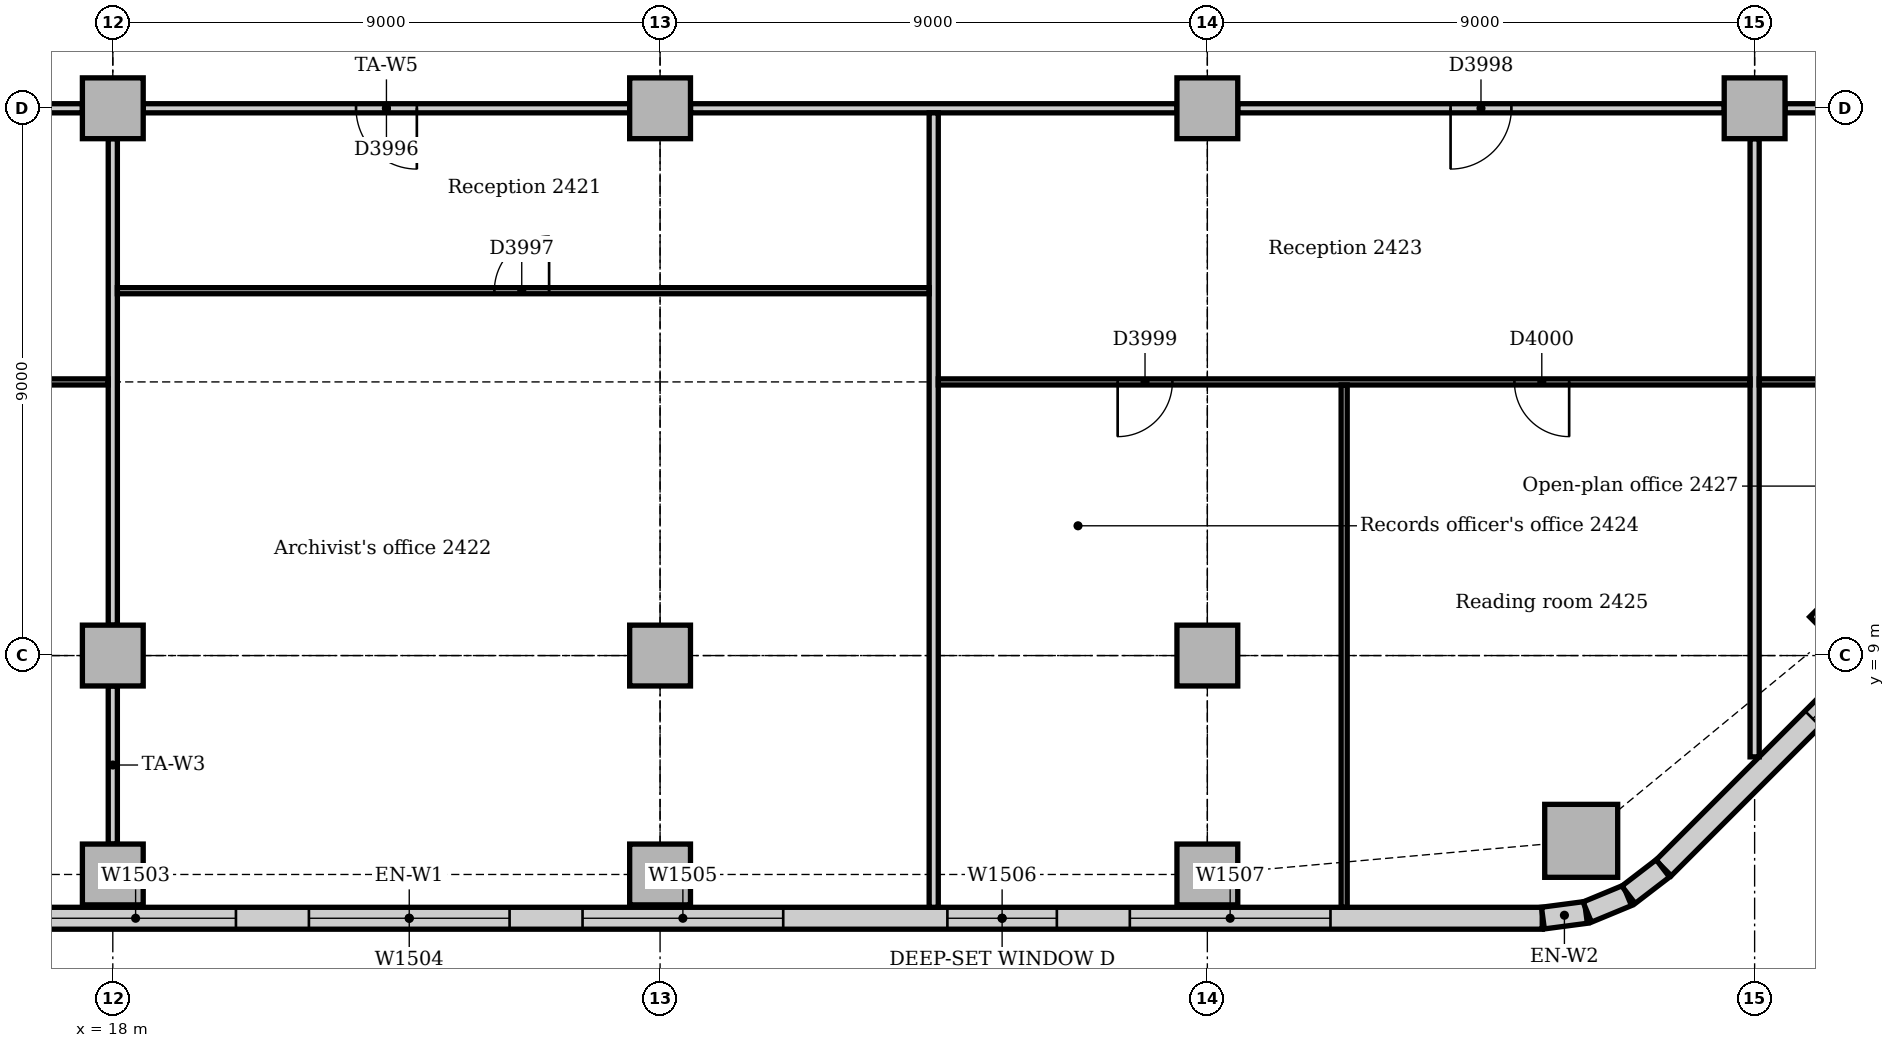
"""IFC4 building model, lengths in metres.
Left out: names, types, materials, properties, quantities, classifications, styles, units other than length and angle.
Written with IfcOpenShell. Run it as: python <this file> out.ifc"""

import sys

from ifc_helpers import new_model, si_unit, direction, frame, frame_2d, origin, origin_2d, place, context, subcontext, project, spatial, rectangle, extrude, element, fill, save


model = new_model("IFC4")
c1 = context("Model", 3, precision=1e-05, world=origin(), true_north=direction((0.0, 1.0)))
c2 = subcontext(c1, "Body", "Model", "MODEL_VIEW")
j1 = project(units=[si_unit("LENGTHUNIT", "METRE"), si_unit("PLANEANGLEUNIT", "RADIAN")], contexts=[c1])
p1 = place(None, origin())
s1 = spatial("IfcSite", under=j1, at=p1, CompositionType="ELEMENT")
p2 = place(p1, origin())
s2 = spatial("IfcBuilding", under=s1, at=p2, CompositionType="ELEMENT")
p3 = place(p2, frame((0.0, 0.0, 104.0)))
s3 = spatial("IfcBuildingStorey", under=s2, at=p3, CompositionType="ELEMENT", Elevation=104.0)
p4 = place(p3, frame((42.148, 5.953, 0.0), z_axis=(0.0, 0.0, 1.0), x_axis=(1.0, 0.0, 0.0)))
e1 = element("IfcColumn", 1, at=p4, inside=s3, PredefinedType="COLUMN", context=c2, shape_type="SweptSolid", body=[
    extrude(rectangle(XDim=1.2, YDim=1.2, at=origin_2d()), origin(), (0.0, 0.0, 1.0), 3.85),
])
for number, where, z_axis, x_axis in (
    (2, (18.0, 5.4, 0.0), (0.0, 0.0, 1.0), (1.0, 0.0, 0.0)),
    (3, (27.0, 5.4, 0.0), (0.0, 0.0, 1.0), (1.0, 0.0, 0.0)),
    (4, (36.0, 5.4, 0.0), (0.0, 0.0, 1.0), (1.0, 0.0, 0.0)),
    (5, (46.614, 9.636, 0.0), (0.0, 0.0, 1.0), (0.707, 0.707, 0.0)),
    (6, (18.0, 9.0, 0.0), (0.0, 0.0, 1.0), (1.0, 0.0, 0.0)),
    (7, (18.0, 18.0, 0.0), (0.0, 0.0, 1.0), (1.0, 0.0, 0.0)),
    (8, (27.0, 9.0, 0.0), (0.0, 0.0, 1.0), (1.0, 0.0, 0.0)),
    (9, (27.0, 18.0, 0.0), (0.0, 0.0, 1.0), (1.0, 0.0, 0.0)),
    (10, (36.0, 9.0, 0.0), (0.0, 0.0, 1.0), (1.0, 0.0, 0.0)),
    (11, (36.0, 18.0, 0.0), (0.0, 0.0, 1.0), (1.0, 0.0, 0.0)),
    (12, (45.0, 18.0, 0.0), (0.0, 0.0, 1.0), (1.0, 0.0, 0.0)),
):
    element("IfcColumn", number, at=place(p3, frame(where, z_axis=z_axis, x_axis=x_axis)), inside=s3, PredefinedType="COLUMN", context=c2, shape_type="SweptSolid", body=[
        extrude(rectangle(XDim=1.0, YDim=1.0, at=origin_2d()), origin(), (0.0, 0.0, 1.0), 3.85),
    ])
p5 = place(p3, frame((4.243, 4.68, 0.0), z_axis=(0.0, 0.0, 1.0), x_axis=(1.0, 0.0, 0.0)))
e13 = element("IfcWall", 13, at=p5, inside=s3, PredefinedType="STANDARD", context=c2, shape_type="SweptSolid", body=[
    extrude(rectangle(XDim=37.265, YDim=0.36, at=frame_2d((18.632, 0.0))), origin(), (0.0, 0.0, 1.0), 3.85),
])
p6 = place(p5, frame((3.482, 0.0, 0.9)))
e14 = element("IfcOpeningElement", 14, at=p6, cuts=e13, PredefinedType="OPENING", context=c2, shape_type="SweptSolid", body=[
    extrude(rectangle(XDim=3.3, YDim=1.6, at=frame_2d((1.65, 0.8))), frame((0.0, 0.19, 0.0), z_axis=(0.0, -1.0, 0.0), x_axis=(1.0, 0.0, 0.0)), (0.0, 0.0, 1.0), 0.38),
])
p7 = place(p5, frame((7.982, 0.0, 0.9)))
e15 = element("IfcOpeningElement", 15, at=p7, cuts=e13, PredefinedType="OPENING", context=c2, shape_type="SweptSolid", body=[
    extrude(rectangle(XDim=3.3, YDim=1.6, at=frame_2d((1.65, 0.8))), frame((0.0, 0.19, 0.0), z_axis=(0.0, -1.0, 0.0), x_axis=(1.0, 0.0, 0.0)), (0.0, 0.0, 1.0), 0.38),
])
p8 = place(p5, frame((12.482, 0.0, 0.9)))
e16 = element("IfcOpeningElement", 16, at=p8, cuts=e13, PredefinedType="OPENING", context=c2, shape_type="SweptSolid", body=[
    extrude(rectangle(XDim=3.3, YDim=1.6, at=frame_2d((1.65, 0.8))), frame((0.0, 0.19, 0.0), z_axis=(0.0, -1.0, 0.0), x_axis=(1.0, 0.0, 0.0)), (0.0, 0.0, 1.0), 0.38),
])
p9 = place(p5, frame((16.982, 0.0, 0.9)))
e17 = element("IfcOpeningElement", 17, at=p9, cuts=e13, PredefinedType="OPENING", context=c2, shape_type="SweptSolid", body=[
    extrude(rectangle(XDim=3.3, YDim=1.6, at=frame_2d((1.65, 0.8))), frame((0.0, 0.19, 0.0), z_axis=(0.0, -1.0, 0.0), x_axis=(1.0, 0.0, 0.0)), (0.0, 0.0, 1.0), 0.38),
])
p10 = place(p5, frame((21.482, 0.0, 0.9)))
e18 = element("IfcOpeningElement", 18, at=p10, cuts=e13, PredefinedType="OPENING", context=c2, shape_type="SweptSolid", body=[
    extrude(rectangle(XDim=3.3, YDim=1.6, at=frame_2d((1.65, 0.8))), frame((0.0, 0.19, 0.0), z_axis=(0.0, -1.0, 0.0), x_axis=(1.0, 0.0, 0.0)), (0.0, 0.0, 1.0), 0.38),
])
p11 = place(p5, frame((27.482, 0.0, 0.9)))
e19 = element("IfcOpeningElement", 19, at=p11, cuts=e13, PredefinedType="OPENING", context=c2, shape_type="SweptSolid", body=[
    extrude(rectangle(XDim=1.8, YDim=1.6, at=frame_2d((0.9, 0.8))), frame((0.0, 0.19, 0.0), z_axis=(0.0, -1.0, 0.0), x_axis=(1.0, 0.0, 0.0)), (0.0, 0.0, 1.0), 0.38),
])
p12 = place(p5, frame((30.482, 0.0, 0.9)))
e20 = element("IfcOpeningElement", 20, at=p12, cuts=e13, PredefinedType="OPENING", context=c2, shape_type="SweptSolid", body=[
    extrude(rectangle(XDim=3.3, YDim=1.6, at=frame_2d((1.65, 0.8))), frame((0.0, 0.19, 0.0), z_axis=(0.0, -1.0, 0.0), x_axis=(1.0, 0.0, 0.0)), (0.0, 0.0, 1.0), 0.38),
])
p13 = place(p3, frame((43.501, 5.506, 0.0), z_axis=(0.0, 0.0, 1.0), x_axis=(0.707106781187, 0.707106781187, 0.0)))
e21 = element("IfcWall", 21, at=p13, inside=s3, PredefinedType="STANDARD", context=c2, shape_type="SweptSolid", body=[
    extrude(rectangle(XDim=10.243, YDim=0.36, at=frame_2d((5.121, 0.0))), origin(), (0.0, 0.0, 1.0), 3.85),
])
p14 = place(p13, frame((3.471, 0.0, 0.9)))
e22 = element("IfcOpeningElement", 22, at=p14, cuts=e21, PredefinedType="OPENING", context=c2, shape_type="SweptSolid", body=[
    extrude(rectangle(XDim=3.3, YDim=1.6, at=frame_2d((1.65, 0.8))), frame((0.0, 0.19, 0.0), z_axis=(0.0, -1.0, 0.0), x_axis=(1.0, 0.0, 0.0)), (0.0, 0.0, 1.0), 0.38),
])
for number, where, z_axis, x_axis in (
    (23, (41.519, 4.683, 0.0), (0.0, 0.0, 1.0), (0.991, 0.131, 0.0)),
    (24, (42.247, 4.782, 0.0), (0.0, 0.0, 1.0), (0.924, 0.383, 0.0)),
):
    element("IfcWall", number, at=place(p3, frame(where, z_axis=z_axis, x_axis=x_axis)), inside=s3, PredefinedType="STANDARD", context=c2, shape_type="SweptSolid", body=[
        extrude(rectangle(XDim=0.713, YDim=0.36, at=frame_2d((0.356, 0.0))), origin(), (0.0, 0.0, 1.0), 3.85),
    ])
p15 = place(p3, frame((42.925, 5.066, 0.0), z_axis=(0.0, 0.0, 1.0), x_axis=(0.793321924995, 0.608802368033, 0.0)))
e25 = element("IfcWall", 25, at=p15, inside=s3, PredefinedType="STANDARD", context=c2, shape_type="SweptSolid", body=[
    extrude(rectangle(XDim=0.713, YDim=0.36, at=frame_2d((0.357, 0.0))), origin(), (0.0, 0.0, 1.0), 3.85),
])
p16 = place(p3, frame((45.5, 18.0, 0.0), z_axis=(0.0, 0.0, 1.0), x_axis=(1.0, 0.0, 0.0)))
e26 = element("IfcWall", 26, at=p16, inside=s3, PredefinedType="PARTITIONING", context=c2, shape_type="SweptSolid", body=[
    extrude(rectangle(XDim=4.85, YDim=0.15, at=frame_2d((2.425, 0.0))), origin(), (0.0, 0.0, 1.0), 3.254),
])
p17 = place(p16, frame((1.9, 0.0, 0.0)))
e27 = element("IfcOpeningElement", 27, at=p17, cuts=e26, PredefinedType="OPENING", context=c2, shape_type="SweptSolid", body=[
    extrude(rectangle(XDim=1.0, YDim=2.1, at=frame_2d((0.5, 1.05))), frame((0.0, 0.085, 0.0), z_axis=(0.0, -1.0, 0.0), x_axis=(1.0, 0.0, 0.0)), (0.0, 0.0, 1.0), 0.17),
])
p18 = place(p3, frame((36.5, 18.0, 0.0), z_axis=(0.0, 0.0, 1.0), x_axis=(1.0, 0.0, 0.0)))
e28 = element("IfcWall", 28, at=p18, inside=s3, PredefinedType="PARTITIONING", context=c2, shape_type="SweptSolid", body=[
    extrude(rectangle(XDim=8.0, YDim=0.15, at=frame_2d((4.0, 0.0))), origin(), (0.0, 0.0, 1.0), 3.158),
])
p19 = place(p18, frame((3.5, 0.0, 0.0)))
e29 = element("IfcOpeningElement", 29, at=p19, cuts=e28, PredefinedType="OPENING", context=c2, shape_type="SweptSolid", body=[
    extrude(rectangle(XDim=1.0, YDim=2.1, at=frame_2d((0.5, 1.05))), frame((0.0, 0.085, 0.0), z_axis=(0.0, -1.0, 0.0), x_axis=(1.0, 0.0, 0.0)), (0.0, 0.0, 1.0), 0.17),
])
p20 = place(p3, frame((27.5, 18.0, 0.0), z_axis=(0.0, 0.0, 1.0), x_axis=(1.0, 0.0, 0.0)))
e30 = element("IfcWall", 30, at=p20, inside=s3, PredefinedType="PARTITIONING", context=c2, shape_type="SweptSolid", body=[
    extrude(rectangle(XDim=8.0, YDim=0.15, at=frame_2d((4.0, 0.0))), origin(), (0.0, 0.0, 1.0), 3.158),
])
p21 = place(p3, frame((18.5, 18.0, 0.0), z_axis=(0.0, 0.0, 1.0), x_axis=(1.0, 0.0, 0.0)))
e31 = element("IfcWall", 31, at=p21, inside=s3, PredefinedType="PARTITIONING", context=c2, shape_type="SweptSolid", body=[
    extrude(rectangle(XDim=8.0, YDim=0.15, at=frame_2d((4.0, 0.0))), origin(), (0.0, 0.0, 1.0), 3.158),
])
p22 = place(p21, frame((3.5, 0.0, 0.0)))
e32 = element("IfcOpeningElement", 32, at=p22, cuts=e31, PredefinedType="OPENING", context=c2, shape_type="SweptSolid", body=[
    extrude(rectangle(XDim=1.0, YDim=2.1, at=frame_2d((0.5, 1.05))), frame((0.0, 0.085, 0.0), z_axis=(0.0, -1.0, 0.0), x_axis=(1.0, 0.0, 0.0)), (0.0, 0.0, 1.0), 0.17),
])
p23 = place(p3, frame((9.5, 18.0, 0.0), z_axis=(0.0, 0.0, 1.0), x_axis=(1.0, 0.0, 0.0)))
e33 = element("IfcWall", 33, at=p23, inside=s3, PredefinedType="PARTITIONING", context=c2, shape_type="SweptSolid", body=[
    extrude(rectangle(XDim=8.0, YDim=0.15, at=frame_2d((4.0, 0.0))), origin(), (0.0, 0.0, 1.0), 3.158),
])
p24 = place(p23, frame((3.5, 0.0, 0.0)))
e34 = element("IfcOpeningElement", 34, at=p24, cuts=e33, PredefinedType="OPENING", context=c2, shape_type="SweptSolid", body=[
    extrude(rectangle(XDim=1.0, YDim=2.1, at=frame_2d((0.5, 1.05))), frame((0.0, 0.085, 0.0), z_axis=(0.0, -1.0, 0.0), x_axis=(1.0, 0.0, 0.0)), (0.0, 0.0, 1.0), 0.17),
])
p25 = place(p3, frame((18.0, 5.9, 0.0), z_axis=(0.0, 0.0, 1.0), x_axis=(0.0, 1.0, 0.0)))
e35 = element("IfcWall", 35, at=p25, inside=s3, PredefinedType="PARTITIONING", context=c2, shape_type="SweptSolid", body=[
    extrude(rectangle(XDim=2.6, YDim=0.15, at=frame_2d((1.3, 0.0))), origin(), (0.0, 0.0, 1.0), 3.652),
])
p26 = place(p3, frame((18.0, 9.5, 0.0), z_axis=(0.0, 0.0, 1.0), x_axis=(0.0, 1.0, 0.0)))
e36 = element("IfcWall", 36, at=p26, inside=s3, PredefinedType="PARTITIONING", context=c2, shape_type="SweptSolid", body=[
    extrude(rectangle(XDim=8.0, YDim=0.15, at=frame_2d((4.0, 0.0))), origin(), (0.0, 0.0, 1.0), 3.256),
])
p27 = place(p3, frame((31.5, 4.86, 0.0), z_axis=(0.0, 0.0, 1.0), x_axis=(0.0, 1.0, 0.0)))
e37 = element("IfcWall", 37, at=p27, inside=s3, PredefinedType="PARTITIONING", context=c2, shape_type="SweptSolid", body=[
    extrude(rectangle(XDim=13.065, YDim=0.15, at=frame_2d((6.532, 0.0))), origin(), (0.0, 0.0, 1.0), 3.85),
])
p28 = place(p3, frame((45.0, 7.334, 0.0), z_axis=(0.0, 0.0, 1.0), x_axis=(0.0, 1.0, 0.0)))
e38 = element("IfcWall", 38, at=p28, inside=s3, PredefinedType="PARTITIONING", context=c2, shape_type="SweptSolid", body=[
    extrude(rectangle(XDim=10.166, YDim=0.15, at=frame_2d((5.083, 0.0))), origin(), (0.0, 0.0, 1.0), 3.256),
])
p29 = place(p3, frame((31.575, 13.5, 0.0), z_axis=(0.0, 0.0, 1.0), x_axis=(1.0, 0.0, 0.0)))
e39 = element("IfcWall", 39, at=p29, inside=s3, PredefinedType="PARTITIONING", context=c2, shape_type="SweptSolid", body=[
    extrude(rectangle(XDim=13.35, YDim=0.1, at=frame_2d((6.675, 0.0))), origin(), (0.0, 0.0, 1.0), 3.354),
])
p30 = place(p29, frame((2.95, 0.0, 0.0)))
e40 = element("IfcOpeningElement", 40, at=p30, cuts=e39, PredefinedType="OPENING", context=c2, shape_type="SweptSolid", body=[
    extrude(rectangle(XDim=0.9, YDim=2.1, at=frame_2d((0.45, 1.05))), frame((0.0, 0.06, 0.0), z_axis=(0.0, -1.0, 0.0), x_axis=(1.0, 0.0, 0.0)), (0.0, 0.0, 1.0), 0.12),
])
p31 = place(p29, frame((9.475, 0.0, 0.0)))
e41 = element("IfcOpeningElement", 41, at=p31, cuts=e39, PredefinedType="OPENING", context=c2, shape_type="SweptSolid", body=[
    extrude(rectangle(XDim=0.9, YDim=2.1, at=frame_2d((0.45, 1.05))), frame((0.0, 0.06, 0.0), z_axis=(0.0, -1.0, 0.0), x_axis=(1.0, 0.0, 0.0)), (0.0, 0.0, 1.0), 0.12),
])
p32 = place(p3, frame((45.075, 13.5, 0.0), z_axis=(0.0, 0.0, 1.0), x_axis=(1.0, 0.0, 0.0)))
e42 = element("IfcWall", 42, at=p32, inside=s3, PredefinedType="PARTITIONING", context=c2, shape_type="SweptSolid", body=[
    extrude(rectangle(XDim=5.969, YDim=0.1, at=frame_2d((2.985, 0.0))), origin(), (0.0, 0.0, 1.0), 3.454),
])
p33 = place(p32, frame((2.55, 0.0, 0.0)))
e43 = element("IfcOpeningElement", 43, at=p33, cuts=e42, PredefinedType="OPENING", context=c2, shape_type="SweptSolid", body=[
    extrude(rectangle(XDim=0.9, YDim=2.1, at=frame_2d((0.45, 1.05))), frame((0.0, 0.06, 0.0), z_axis=(0.0, -1.0, 0.0), x_axis=(1.0, 0.0, 0.0)), (0.0, 0.0, 1.0), 0.12),
])
p34 = place(p3, frame((0.36, 13.5, 0.0), z_axis=(0.0, 0.0, 1.0), x_axis=(1.0, 0.0, 0.0)))
e44 = element("IfcWall", 44, at=p34, inside=s3, PredefinedType="PARTITIONING", context=c2, shape_type="SweptSolid", body=[
    extrude(rectangle(XDim=17.565, YDim=0.1, at=frame_2d((8.783, 0.0))), origin(), (0.0, 0.0, 1.0), 3.354),
])
p35 = place(p34, frame((3.95, 0.0, 0.0)))
e45 = element("IfcOpeningElement", 45, at=p35, cuts=e44, PredefinedType="OPENING", context=c2, shape_type="SweptSolid", body=[
    extrude(rectangle(XDim=0.9, YDim=2.1, at=frame_2d((0.45, 1.05))), frame((0.0, 0.06, 0.0), z_axis=(0.0, -1.0, 0.0), x_axis=(1.0, 0.0, 0.0)), (0.0, 0.0, 1.0), 0.12),
])
p36 = place(p34, frame((12.59, 0.0, 0.0)))
e46 = element("IfcOpeningElement", 46, at=p36, cuts=e44, PredefinedType="OPENING", context=c2, shape_type="SweptSolid", body=[
    extrude(rectangle(XDim=0.9, YDim=2.1, at=frame_2d((0.45, 1.05))), frame((0.0, 0.06, 0.0), z_axis=(0.0, -1.0, 0.0), x_axis=(1.0, 0.0, 0.0)), (0.0, 0.0, 1.0), 0.12),
])
p37 = place(p3, frame((18.075, 15.0, 0.0), z_axis=(0.0, 0.0, 1.0), x_axis=(1.0, 0.0, 0.0)))
e47 = element("IfcWall", 47, at=p37, inside=s3, PredefinedType="PARTITIONING", context=c2, shape_type="SweptSolid", body=[
    extrude(rectangle(XDim=13.35, YDim=0.1, at=frame_2d((6.675, 0.0))), origin(), (0.0, 0.0, 1.0), 3.85),
])
p38 = place(p37, frame((6.2, 0.0, 0.0)))
e48 = element("IfcOpeningElement", 48, at=p38, cuts=e47, PredefinedType="OPENING", context=c2, shape_type="SweptSolid", body=[
    extrude(rectangle(XDim=0.9, YDim=2.1, at=frame_2d((0.45, 1.05))), frame((0.0, 0.06, 0.0), z_axis=(0.0, -1.0, 0.0), x_axis=(1.0, 0.0, 0.0)), (0.0, 0.0, 1.0), 0.12),
])
p39 = place(p3, frame((38.25, 4.86, 0.0), z_axis=(0.0, 0.0, 1.0), x_axis=(0.0, 1.0, 0.0)))
e49 = element("IfcWall", 49, at=p39, inside=s3, PredefinedType="PARTITIONING", context=c2, shape_type="SweptSolid", body=[
    extrude(rectangle(XDim=8.59, YDim=0.1, at=frame_2d((4.295, 0.0))), origin(), (0.0, 0.0, 1.0), 3.85),
])
p40 = place(p8, origin())
e50 = element("IfcWindow", 50, at=p40, inside=s3, PartitioningType="SINGLE_PANEL", PredefinedType="WINDOW", context=c2, shape_type="SweptSolid", body=[
    extrude(rectangle(XDim=3.3, YDim=1.6, at=frame_2d((1.65, 0.8))), frame((0.0, 0.13, 0.0), z_axis=(0.0, -1.0, 0.0), x_axis=(1.0, 0.0, 0.0)), (0.0, 0.0, 1.0), 0.06),
])
fill(e16, e50)
p41 = place(p9, origin())
e51 = element("IfcWindow", 51, at=p41, inside=s3, PartitioningType="SINGLE_PANEL", PredefinedType="WINDOW", context=c2, shape_type="SweptSolid", body=[
    extrude(rectangle(XDim=3.3, YDim=1.6, at=frame_2d((1.65, 0.8))), frame((0.0, 0.13, 0.0), z_axis=(0.0, -1.0, 0.0), x_axis=(1.0, 0.0, 0.0)), (0.0, 0.0, 1.0), 0.06),
])
fill(e17, e51)
p42 = place(p10, origin())
e52 = element("IfcWindow", 52, at=p42, inside=s3, PartitioningType="SINGLE_PANEL", PredefinedType="WINDOW", context=c2, shape_type="SweptSolid", body=[
    extrude(rectangle(XDim=3.3, YDim=1.6, at=frame_2d((1.65, 0.8))), frame((0.0, 0.13, 0.0), z_axis=(0.0, -1.0, 0.0), x_axis=(1.0, 0.0, 0.0)), (0.0, 0.0, 1.0), 0.06),
])
fill(e18, e52)
p43 = place(p11, origin())
e53 = element("IfcWindow", 53, at=p43, inside=s3, PartitioningType="SINGLE_PANEL", PredefinedType="WINDOW", context=c2, shape_type="SweptSolid", body=[
    extrude(rectangle(XDim=1.8, YDim=1.6, at=frame_2d((0.9, 0.8))), frame((0.0, 0.13, 0.0), z_axis=(0.0, -1.0, 0.0), x_axis=(1.0, 0.0, 0.0)), (0.0, 0.0, 1.0), 0.06),
])
fill(e19, e53)
p44 = place(p12, origin())
e54 = element("IfcWindow", 54, at=p44, inside=s3, PartitioningType="SINGLE_PANEL", PredefinedType="WINDOW", context=c2, shape_type="SweptSolid", body=[
    extrude(rectangle(XDim=3.3, YDim=1.6, at=frame_2d((1.65, 0.8))), frame((0.0, 0.13, 0.0), z_axis=(0.0, -1.0, 0.0), x_axis=(1.0, 0.0, 0.0)), (0.0, 0.0, 1.0), 0.06),
])
fill(e20, e54)
p45 = place(p14, origin())
e55 = element("IfcWindow", 55, at=p45, inside=s3, PartitioningType="SINGLE_PANEL", PredefinedType="WINDOW", context=c2, shape_type="SweptSolid", body=[
    extrude(rectangle(XDim=3.3, YDim=1.6, at=frame_2d((1.65, 0.8))), frame((0.0, 0.13, 0.0), z_axis=(0.0, -1.0, 0.0), x_axis=(1.0, 0.0, 0.0)), (0.0, 0.0, 1.0), 0.06),
])
fill(e22, e55)
p46 = place(p22, frame((1.0, 0.0, 0.0), z_axis=(0.0, 0.0, 1.0), x_axis=(-1.0, 0.0, 0.0)))
e56 = element("IfcDoor", 56, at=p46, inside=s3, OperationType="SINGLE_SWING_LEFT", PredefinedType="DOOR", context=c2, shape_type="SweptSolid", body=[
    extrude(rectangle(XDim=1.0, YDim=2.1, at=frame_2d((0.5, 1.05))), frame((0.0, 0.025, 0.0), z_axis=(0.0, -1.0, 0.0), x_axis=(1.0, 0.0, 0.0)), (0.0, 0.0, 1.0), 0.05),
])
fill(e32, e56)
p47 = place(p38, origin())
e57 = element("IfcDoor", 57, at=p47, inside=s3, OperationType="SINGLE_SWING_RIGHT", PredefinedType="DOOR", context=c2, shape_type="SweptSolid", body=[
    extrude(rectangle(XDim=0.9, YDim=2.1, at=frame_2d((0.45, 1.05))), frame((0.0, 0.025, 0.0), z_axis=(0.0, -1.0, 0.0), x_axis=(1.0, 0.0, 0.0)), (0.0, 0.0, 1.0), 0.05),
])
fill(e48, e57)
p48 = place(p19, frame((1.0, 0.0, 0.0), z_axis=(0.0, 0.0, 1.0), x_axis=(-1.0, 0.0, 0.0)))
e58 = element("IfcDoor", 58, at=p48, inside=s3, OperationType="SINGLE_SWING_RIGHT", PredefinedType="DOOR", context=c2, shape_type="SweptSolid", body=[
    extrude(rectangle(XDim=1.0, YDim=2.1, at=frame_2d((0.5, 1.05))), frame((0.0, 0.025, 0.0), z_axis=(0.0, -1.0, 0.0), x_axis=(1.0, 0.0, 0.0)), (0.0, 0.0, 1.0), 0.05),
])
fill(e29, e58)
p49 = place(p30, frame((0.9, 0.0, 0.0), z_axis=(0.0, 0.0, 1.0), x_axis=(-1.0, 0.0, 0.0)))
e59 = element("IfcDoor", 59, at=p49, inside=s3, OperationType="SINGLE_SWING_RIGHT", PredefinedType="DOOR", context=c2, shape_type="SweptSolid", body=[
    extrude(rectangle(XDim=0.9, YDim=2.1, at=frame_2d((0.45, 1.05))), frame((0.0, 0.025, 0.0), z_axis=(0.0, -1.0, 0.0), x_axis=(1.0, 0.0, 0.0)), (0.0, 0.0, 1.0), 0.05),
])
fill(e40, e59)
p50 = place(p31, frame((0.9, 0.0, 0.0), z_axis=(0.0, 0.0, 1.0), x_axis=(-1.0, 0.0, 0.0)))
e60 = element("IfcDoor", 60, at=p50, inside=s3, OperationType="SINGLE_SWING_LEFT", PredefinedType="DOOR", context=c2, shape_type="SweptSolid", body=[
    extrude(rectangle(XDim=0.9, YDim=2.1, at=frame_2d((0.45, 1.05))), frame((0.0, 0.025, 0.0), z_axis=(0.0, -1.0, 0.0), x_axis=(1.0, 0.0, 0.0)), (0.0, 0.0, 1.0), 0.05),
])
fill(e41, e60)
save(model, sys.argv[1])
